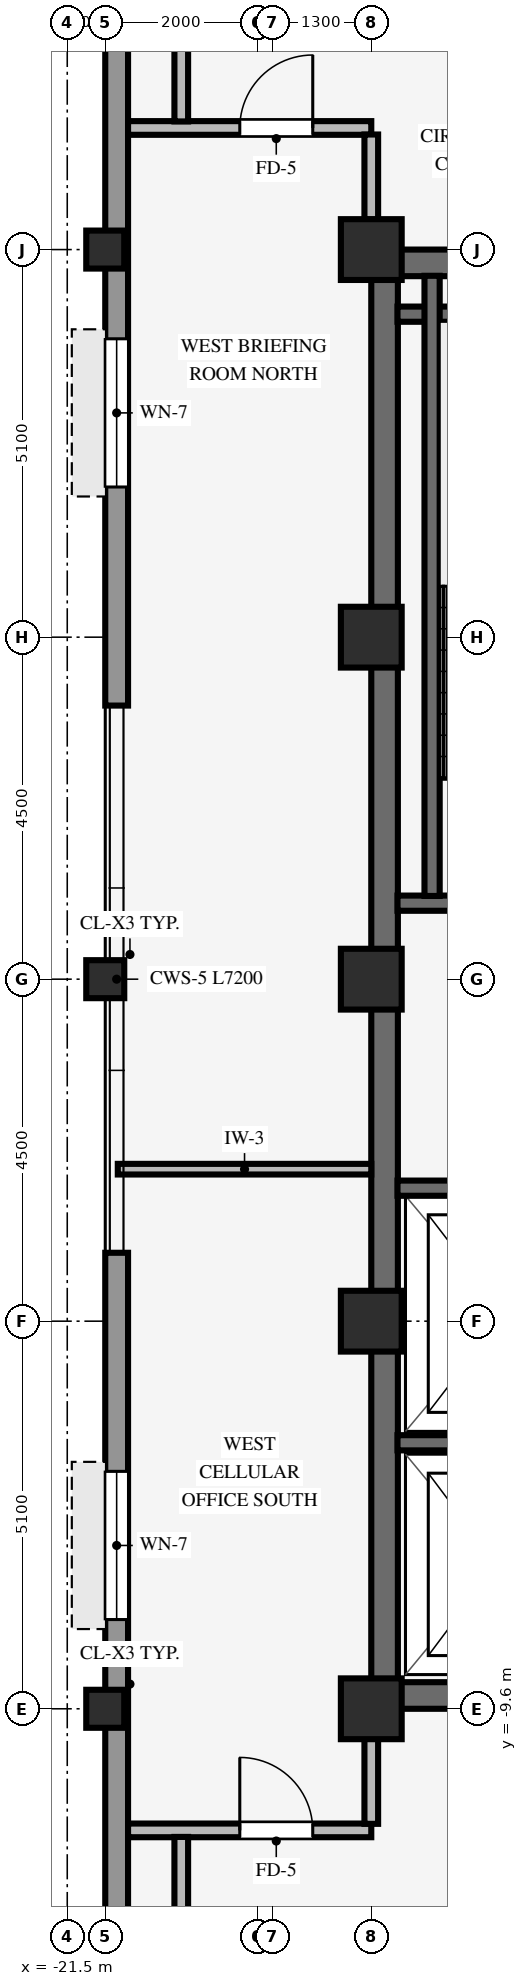
"""IFC4 building model, lengths in metres.
Left out: names, types, materials, properties, quantities, classifications, styles, units other than length and angle.
Written with IfcOpenShell. Run it as: python <this file> out.ifc"""

import sys

from ifc_helpers import new_model, si_unit, direction, frame, frame_2d, origin, origin_2d, place, context, subcontext, project, spatial, rectangle, hollow_rectangle, extrude, source, transform, mapped, element, fill, save


model = new_model("IFC4")
c1 = context("Model", 3, precision=1e-05, world=origin(), true_north=direction((0.0, 1.0)))
c2 = subcontext(c1, "Body", "Model", "MODEL_VIEW")
j1 = project(units=[si_unit("LENGTHUNIT", "METRE"), si_unit("PLANEANGLEUNIT", "RADIAN")], contexts=[c1])
p1 = place(None, origin())
s1 = spatial("IfcSite", under=j1, at=p1, CompositionType="ELEMENT")
p2 = place(p1, origin())
s2 = spatial("IfcBuilding", under=s1, at=p2, CompositionType="ELEMENT")
p3 = place(p2, frame((0.0, 0.0, 249.3)))
s3 = spatial("IfcBuildingStorey", under=s2, at=p3, CompositionType="ELEMENT", Elevation=249.3)
for number, where, z_axis, x_axis in (
    (1, (-17.5, -9.425, 0.0), (0.0, 0.0, 1.0), (1.0, 0.0, 0.0)),
    (2, (-17.5, 9.425, 0.0), (0.0, 0.0, 1.0), (1.0, 0.0, 0.0)),
):
    element("IfcWall", number, at=place(p3, frame(where, z_axis=z_axis, x_axis=x_axis)), inside=s3, PredefinedType="SHEAR", context=c2, shape_type="SweptSolid", body=[
        extrude(rectangle(XDim=8.5, YDim=0.35, at=frame_2d((4.25, 0.0))), origin(), (0.0, 0.0, 1.0), 3.25),
    ])
p4 = place(p3, frame((-17.325, -9.255, 0.0), z_axis=(0.0, 0.0, 1.0), x_axis=(0.0, 1.0, 0.0)))
e3 = element("IfcWall", 3, at=p4, inside=s3, PredefinedType="SHEAR", context=c2, shape_type="SweptSolid", body=[
    extrude(rectangle(XDim=18.51, YDim=0.35, at=frame_2d((9.255, 0.0))), origin(), (0.0, 0.0, 1.0), 3.25),
])
for number, where, z_axis, x_axis in (
    (4, (-17.5, -9.6, 0.0), (0.0, 0.0, 1.0), (1.0, 0.0, 0.0)),
    (5, (-17.5, -4.5, 0.0), (0.0, 0.0, 1.0), (1.0, 0.0, 0.0)),
    (6, (-17.5, 4.5, 0.0), (0.0, 0.0, 1.0), (1.0, 0.0, 0.0)),
    (7, (-17.5, 9.6, 0.0), (0.0, 0.0, 1.0), (1.0, 0.0, 0.0)),
    (8, (-17.5, 0.0, 0.0), (0.0, 0.0, 1.0), (1.0, 0.0, 0.0)),
):
    element("IfcColumn", number, at=place(p3, frame(where, z_axis=z_axis, x_axis=x_axis)), inside=s3, PredefinedType="COLUMN", context=c2, shape_type="SweptSolid", body=[
        extrude(rectangle(XDim=0.8, YDim=0.8, at=origin_2d()), origin(), (0.0, 0.0, 1.0), 3.25),
    ])
for number, where, z_axis, x_axis in (
    (9, (-21.0, -9.6, 0.0), (0.0, 0.0, 1.0), (1.0, 0.0, 0.0)),
    (10, (-21.0, 0.0, 0.0), (0.0, 0.0, 1.0), (1.0, 0.0, 0.0)),
    (11, (-21.0, 9.6, 0.0), (0.0, 0.0, 1.0), (1.0, 0.0, 0.0)),
):
    element("IfcColumn", number, at=place(p3, frame(where, z_axis=z_axis, x_axis=x_axis)), inside=s3, PredefinedType="COLUMN", context=c2, shape_type="SweptSolid", body=[
        extrude(hollow_rectangle(XDim=0.5, YDim=0.5, WallThickness=0.032, InnerFilletRadius=0.032, OuterFilletRadius=0.064, at=origin_2d()), origin(), (0.0, 0.0, 1.0), 3.25),
    ])
p5 = place(p3, frame((-20.85, -17.004, 0.0), z_axis=(0.0, 0.0, 1.0), x_axis=(0.0, 1.0, 0.0)))
e12 = element("IfcWall", 12, at=p5, inside=s3, PredefinedType="STANDARD", context=c2, shape_type="SweptSolid", body=[
    extrude(rectangle(XDim=13.404, YDim=0.3, at=frame_2d((6.702, 0.0))), origin(), (0.0, 0.0, 1.0), 2.585),
])
p6 = place(p5, frame((8.578, 0.0, 0.8)))
e13 = element("IfcOpeningElement", 13, at=p6, cuts=e12, PredefinedType="OPENING", context=c2, shape_type="SweptSolid", body=[
    extrude(rectangle(XDim=1.95, YDim=1.48, at=frame_2d((0.975, 0.74))), frame((0.0, 0.16, 0.0), z_axis=(0.0, -1.0, 0.0), x_axis=(1.0, 0.0, 0.0)), (0.0, 0.0, 1.0), 0.32),
])
p7 = place(p3, frame((-20.85, 3.6, 0.0), z_axis=(0.0, 0.0, 1.0), x_axis=(0.0, 1.0, 0.0)))
e14 = element("IfcWall", 14, at=p7, inside=s3, PredefinedType="STANDARD", context=c2, shape_type="SweptSolid", body=[
    extrude(rectangle(XDim=13.404, YDim=0.3, at=frame_2d((6.702, 0.0))), origin(), (0.0, 0.0, 1.0), 2.585),
])
p8 = place(p7, frame((2.876, 0.0, 0.8)))
e15 = element("IfcOpeningElement", 15, at=p8, cuts=e14, PredefinedType="OPENING", context=c2, shape_type="SweptSolid", body=[
    extrude(rectangle(XDim=1.95, YDim=1.48, at=frame_2d((0.975, 0.74))), frame((0.0, 0.16, 0.0), z_axis=(0.0, -1.0, 0.0), x_axis=(1.0, 0.0, 0.0)), (0.0, 0.0, 1.0), 0.32),
])
for number, where, z_axis, x_axis in (
    (16, (-17.155, 1.0, 0.0), (0.0, 0.0, 1.0), (1.0, 0.0, 0.0)),
    (17, (-17.155, 8.75, 0.0), (0.0, 0.0, 1.0), (1.0, 0.0, 0.0)),
):
    element("IfcWall", number, at=place(p3, frame(where, z_axis=z_axis, x_axis=x_axis)), inside=s3, PredefinedType="SHEAR", context=c2, shape_type="SweptSolid", body=[
        extrude(rectangle(XDim=3.62, YDim=0.2, at=frame_2d((1.81, 0.0))), origin(), (0.0, 0.0, 1.0), 3.25),
    ])
p9 = place(p3, frame((-16.7, 1.095, 0.0), z_axis=(0.0, 0.0, 1.0), x_axis=(0.0, 1.0, 0.0)))
e18 = element("IfcWall", 18, at=p9, inside=s3, PredefinedType="SHEAR", context=c2, shape_type="SweptSolid", body=[
    extrude(rectangle(XDim=8.16, YDim=0.2, at=frame_2d((4.08, 0.0))), origin(), (0.0, 0.0, 1.0), 3.25),
])
p10 = place(p3, frame((-17.155, -6.1, 0.0), z_axis=(0.0, 0.0, 1.0), x_axis=(1.0, 0.0, 0.0)))
e19 = element("IfcWall", 19, at=p10, inside=s3, PredefinedType="SHEAR", context=c2, shape_type="SweptSolid", body=[
    extrude(rectangle(XDim=2.905, YDim=0.2, at=frame_2d((1.453, 0.0))), origin(), (0.0, 0.0, 1.0), 3.25),
])
p11 = place(p3, frame((-17.155, -2.75, 0.0), z_axis=(0.0, 0.0, 1.0), x_axis=(1.0, 0.0, 0.0)))
e20 = element("IfcWall", 20, at=p11, inside=s3, PredefinedType="SHEAR", context=c2, shape_type="SweptSolid", body=[
    extrude(rectangle(XDim=2.71, YDim=0.2, at=frame_2d((1.355, 0.0))), origin(), (0.0, 0.0, 1.0), 3.25),
])
p12 = place(p3, frame((-20.7, -11.2, 0.0), z_axis=(0.0, 0.0, 1.0), x_axis=(1.0, 0.0, 0.0)))
e21 = element("IfcWall", 21, at=p12, inside=s3, PredefinedType="PARTITIONING", context=c2, shape_type="SweptSolid", body=[
    extrude(rectangle(XDim=3.2, YDim=0.18, at=frame_2d((1.6, 0.0))), origin(), (0.0, 0.0, 1.0), 3.24),
])
p13 = place(p12, frame((1.47, 0.0, 0.0)))
e22 = element("IfcOpeningElement", 22, at=p13, cuts=e21, PredefinedType="OPENING", context=c2, shape_type="SweptSolid", body=[
    extrude(rectangle(XDim=0.96, YDim=2.1, at=frame_2d((0.48, 1.05))), frame((0.0, 0.1, 0.0), z_axis=(0.0, -1.0, 0.0), x_axis=(1.0, 0.0, 0.0)), (0.0, 0.0, 1.0), 0.2),
])
p14 = place(p3, frame((-20.835, -2.5, 0.0), z_axis=(0.0, 0.0, 1.0), x_axis=(1.0, 0.0, 0.0)))
e23 = element("IfcWall", 23, at=p14, inside=s3, PredefinedType="PARTITIONING", context=c2, shape_type="SweptSolid", body=[
    extrude(rectangle(XDim=3.335, YDim=0.14, at=frame_2d((1.667, 0.0))), origin(), (0.0, 0.0, 1.0), 3.24),
])
p15 = place(p3, frame((-20.7, 11.2, 0.0), z_axis=(0.0, 0.0, 1.0), x_axis=(1.0, 0.0, 0.0)))
e24 = element("IfcWall", 24, at=p15, inside=s3, PredefinedType="PARTITIONING", context=c2, shape_type="SweptSolid", body=[
    extrude(rectangle(XDim=3.2, YDim=0.18, at=frame_2d((1.6, 0.0))), origin(), (0.0, 0.0, 1.0), 3.24),
])
p16 = place(p15, frame((1.47, 0.0, 0.0)))
e25 = element("IfcOpeningElement", 25, at=p16, cuts=e24, PredefinedType="OPENING", context=c2, shape_type="SweptSolid", body=[
    extrude(rectangle(XDim=0.96, YDim=2.1, at=frame_2d((0.48, 1.05))), frame((0.0, 0.1, 0.0), z_axis=(0.0, -1.0, 0.0), x_axis=(1.0, 0.0, 0.0)), (0.0, 0.0, 1.0), 0.2),
])
for number, where, z_axis, x_axis in (
    (26, (-20.0, -13.514, 0.0), (0.0, 0.0, 1.0), (0.0, 1.0, 0.0)),
    (27, (-20.0, 11.286, 0.0), (0.0, 0.0, 1.0), (0.0, 1.0, 0.0)),
):
    element("IfcWall", number, at=place(p3, frame(where, z_axis=z_axis, x_axis=x_axis)), inside=s3, PredefinedType="PARTITIONING", context=c2, shape_type="SweptSolid", body=[
        extrude(rectangle(XDim=2.228, YDim=0.18, at=frame_2d((1.114, 0.0))), origin(), (0.0, 0.0, 1.0), 3.24),
    ])
for number, where, z_axis, x_axis in (
    (28, (-17.5, -11.114, 0.0), (0.0, 0.0, 1.0), (0.0, 1.0, 0.0)),
    (29, (-17.5, 9.996, 0.0), (0.0, 0.0, 1.0), (0.0, 1.0, 0.0)),
):
    element("IfcWall", number, at=place(p3, frame(where, z_axis=z_axis, x_axis=x_axis)), inside=s3, PredefinedType="PARTITIONING", context=c2, shape_type="SweptSolid", body=[
        extrude(rectangle(XDim=1.118, YDim=0.18, at=frame_2d((0.559, 0.0))), origin(), (0.0, 0.0, 1.0), 2.335),
    ])
m1 = source(origin(), c2, "Body", "SweptSolid", [
    extrude(rectangle(XDim=1.95, YDim=1.48, at=frame_2d((0.975, 0.74))), frame((0.0, 0.03, 0.0), z_axis=(0.0, -1.0, 0.0), x_axis=(1.0, 0.0, 0.0)), (0.0, 0.0, 1.0), 0.06),
])
p17 = place(p6, origin())
e30 = element("IfcWindow", 30, at=p17, inside=s3, PartitioningType="SINGLE_PANEL", PredefinedType="WINDOW", context=c2, shape_type="MappedRepresentation", body=[
    mapped(m1, transform((0.0, 0.0, 0.0), scale=1.0)),
])
fill(e13, e30)
p18 = place(p8, origin())
e31 = element("IfcWindow", 31, at=p18, inside=s3, PartitioningType="SINGLE_PANEL", PredefinedType="WINDOW", context=c2, shape_type="MappedRepresentation", body=[
    mapped(m1, transform((0.0, 0.0, 0.0), scale=1.0)),
])
fill(e15, e31)
m2 = source(origin(), c2, "Body", "SweptSolid", [
    extrude(rectangle(XDim=0.96, YDim=2.1, at=frame_2d((0.48, 1.05))), frame((0.0, 0.025, 0.0), z_axis=(0.0, -1.0, 0.0), x_axis=(1.0, 0.0, 0.0)), (0.0, 0.0, 1.0), 0.05),
])
p19 = place(p13, origin())
e32 = element("IfcDoor", 32, at=p19, inside=s3, OperationType="SINGLE_SWING_LEFT", PredefinedType="DOOR", context=c2, shape_type="MappedRepresentation", body=[
    mapped(m2, transform((0.0, 0.0, 0.0), scale=1.0)),
])
fill(e22, e32)
p20 = place(p16, origin())
e33 = element("IfcDoor", 33, at=p20, inside=s3, OperationType="SINGLE_SWING_RIGHT", PredefinedType="DOOR", context=c2, shape_type="MappedRepresentation", body=[
    mapped(m2, transform((0.0, 0.0, 0.0), scale=1.0)),
])
fill(e25, e33)
save(model, sys.argv[1])
